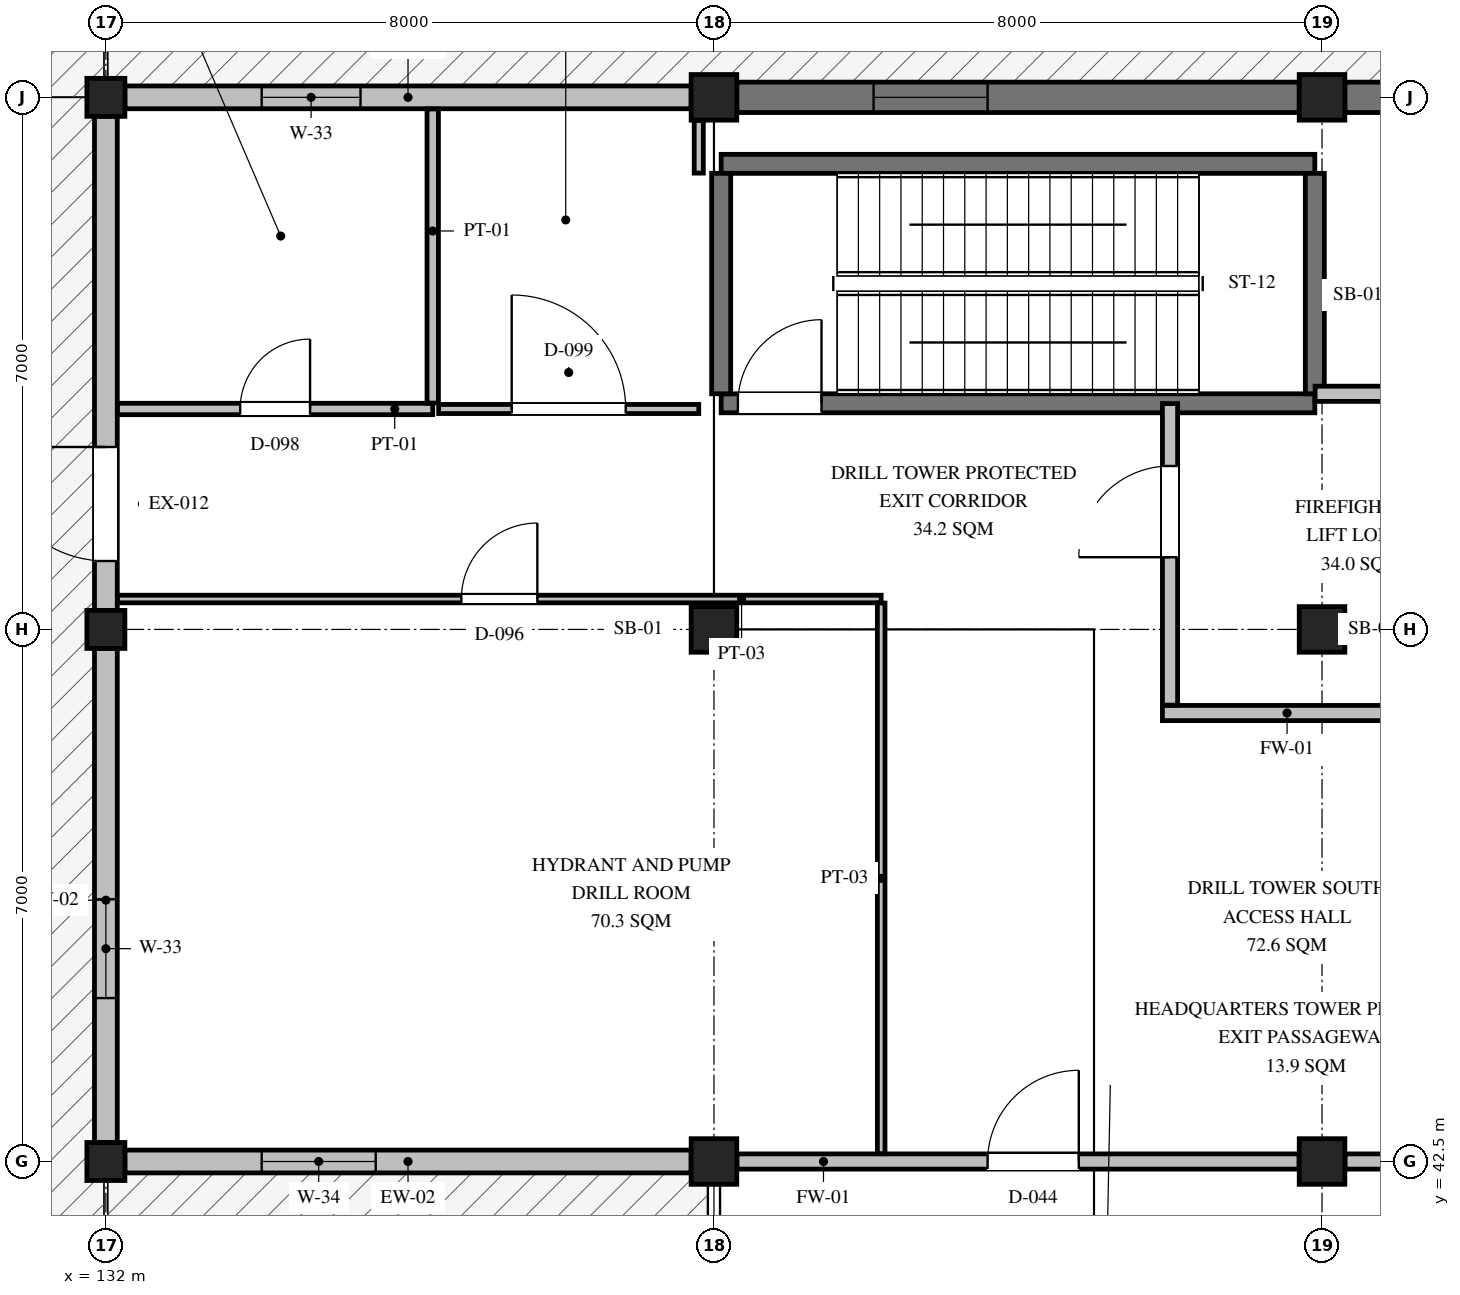
"""IFC4 building model, lengths in metres.
Left out: names, types, materials, properties, quantities, classifications, styles, units other than length and angle.
Written with IfcOpenShell. Run it as: python <this file> out.ifc"""

import sys

from ifc_helpers import new_model, si_unit, direction, frame, frame_2d, origin, origin_2d, place, context, subcontext, project, spatial, rectangle, extrude, element, fill, save


model = new_model("IFC4")
c1 = context("Model", 3, precision=1e-05, world=origin(), true_north=direction((0.0, 1.0)))
c2 = subcontext(c1, "Body", "Model", "MODEL_VIEW")
j1 = project(units=[si_unit("LENGTHUNIT", "METRE"), si_unit("PLANEANGLEUNIT", "RADIAN")], contexts=[c1])
p1 = place(None, origin())
s1 = spatial("IfcSite", under=j1, at=p1, CompositionType="ELEMENT")
p2 = place(p1, origin())
s2 = spatial("IfcBuilding", under=s1, at=p2, CompositionType="ELEMENT")
p3 = place(p2, frame((0.0, 0.0, 0.45)))
s3 = spatial("IfcBuildingStorey", under=s2, at=p3, CompositionType="ELEMENT", Elevation=0.45)
for number, where, z_axis, x_axis in (
    (1, (132.0, 42.5, -0.45), (0.0, 0.0, 1.0), (1.0, 0.0, 0.0)),
    (2, (132.0, 49.5, -0.45), (0.0, 0.0, 1.0), (1.0, 0.0, 0.0)),
    (3, (132.0, 56.5, -0.45), (0.0, 0.0, 1.0), (1.0, 0.0, 0.0)),
):
    element("IfcColumn", number, at=place(p3, frame(where, z_axis=z_axis, x_axis=x_axis)), inside=s3, PredefinedType="COLUMN", context=c2, shape_type="SweptSolid", body=[
        extrude(rectangle(XDim=0.5, YDim=0.5, at=origin_2d()), origin(), (0.0, 0.0, 1.0), 5.85),
    ])
for number, where, z_axis, x_axis in (
    (4, (140.0, 42.5, -0.45), (0.0, 0.0, 1.0), (1.0, 0.0, 0.0)),
    (5, (140.0, 49.5, -0.45), (0.0, 0.0, 1.0), (1.0, 0.0, 0.0)),
    (6, (140.0, 56.5, -0.45), (0.0, 0.0, 1.0), (1.0, 0.0, 0.0)),
    (7, (148.0, 42.5, -0.45), (0.0, 0.0, 1.0), (1.0, 0.0, 0.0)),
    (8, (148.0, 49.5, -0.45), (0.0, 0.0, 1.0), (1.0, 0.0, 0.0)),
    (9, (148.0, 56.5, -0.45), (0.0, 0.0, 1.0), (1.0, 0.0, 0.0)),
):
    element("IfcColumn", number, at=place(p3, frame(where, z_axis=z_axis, x_axis=x_axis)), inside=s3, PredefinedType="COLUMN", context=c2, shape_type="SweptSolid", body=[
        extrude(rectangle(XDim=0.6, YDim=0.6, at=origin_2d()), origin(), (0.0, 0.0, 1.0), 5.85),
    ])
p4 = place(p3, frame((132.25, 56.5, 0.0), z_axis=(0.0, 0.0, 1.0), x_axis=(1.0, 0.0, 0.0)))
e10 = element("IfcWall", 10, at=p4, inside=s3, PredefinedType="SOLIDWALL", context=c2, shape_type="SweptSolid", body=[
    extrude(rectangle(XDim=7.45, YDim=0.3, at=frame_2d((3.725, 0.0))), origin(), (0.0, 0.0, 1.0), 4.794),
])
p5 = place(p4, frame((1.8, 0.0, 0.9)))
e11 = element("IfcOpeningElement", 11, at=p5, cuts=e10, PredefinedType="OPENING", context=c2, shape_type="SweptSolid", body=[
    extrude(rectangle(XDim=1.3, YDim=2.0, at=frame_2d((0.65, 1.0))), frame((0.0, 0.16, 0.0), z_axis=(0.0, -1.0, 0.0), x_axis=(1.0, 0.0, 0.0)), (0.0, 0.0, 1.0), 0.32),
])
p6 = place(p3, frame((140.3, 56.5, 0.0), z_axis=(0.0, 0.0, 1.0), x_axis=(1.0, 0.0, 0.0)))
e12 = element("IfcWall", 12, at=p6, inside=s3, PredefinedType="SHEAR", context=c2, shape_type="SweptSolid", body=[
    extrude(rectangle(XDim=7.4, YDim=0.4, at=frame_2d((3.7, 0.0))), origin(), (0.0, 0.0, 1.0), 5.2),
])
p7 = place(p6, frame((1.8, 0.0, 0.9)))
e13 = element("IfcOpeningElement", 13, at=p7, cuts=e12, PredefinedType="OPENING", context=c2, shape_type="SweptSolid", body=[
    extrude(rectangle(XDim=1.5, YDim=2.1, at=frame_2d((0.75, 1.05))), frame((0.0, 0.21, 0.0), z_axis=(0.0, -1.0, 0.0), x_axis=(1.0, 0.0, 0.0)), (0.0, 0.0, 1.0), 0.42),
])
p8 = place(p3, frame((148.3, 56.5, 0.0), z_axis=(0.0, 0.0, 1.0), x_axis=(1.0, 0.0, 0.0)))
e14 = element("IfcWall", 14, at=p8, inside=s3, PredefinedType="SHEAR", context=c2, shape_type="SweptSolid", body=[
    extrude(rectangle(XDim=12.4, YDim=0.4, at=frame_2d((6.2, 0.0))), origin(), (0.0, 0.0, 1.0), 5.2),
])
p9 = place(p8, frame((1.8, 0.0, 0.9)))
e15 = element("IfcOpeningElement", 15, at=p9, cuts=e14, PredefinedType="OPENING", context=c2, shape_type="SweptSolid", body=[
    extrude(rectangle(XDim=1.8, YDim=2.1, at=frame_2d((0.9, 1.05))), frame((0.0, 0.21, 0.0), z_axis=(0.0, -1.0, 0.0), x_axis=(1.0, 0.0, 0.0)), (0.0, 0.0, 1.0), 0.42),
])
p10 = place(p3, frame((132.0, 42.75, 0.0), z_axis=(0.0, 0.0, 1.0), x_axis=(0.0, 1.0, 0.0)))
e16 = element("IfcWall", 16, at=p10, inside=s3, PredefinedType="SOLIDWALL", context=c2, shape_type="SweptSolid", body=[
    extrude(rectangle(XDim=6.5, YDim=0.3, at=frame_2d((3.25, 0.0))), origin(), (0.0, 0.0, 1.0), 4.854),
])
p11 = place(p10, frame((1.9, 0.0, 0.85)))
e17 = element("IfcOpeningElement", 17, at=p11, cuts=e16, PredefinedType="OPENING", context=c2, shape_type="SweptSolid", body=[
    extrude(rectangle(XDim=1.3, YDim=2.0, at=frame_2d((0.65, 1.0))), frame((0.0, 0.16, 0.0), z_axis=(0.0, -1.0, 0.0), x_axis=(1.0, 0.0, 0.0)), (0.0, 0.0, 1.0), 0.32),
])
p12 = place(p3, frame((132.0, 49.75, 0.0), z_axis=(0.0, 0.0, 1.0), x_axis=(0.0, 1.0, 0.0)))
e18 = element("IfcWall", 18, at=p12, inside=s3, PredefinedType="SOLIDWALL", context=c2, shape_type="SweptSolid", body=[
    extrude(rectangle(XDim=6.5, YDim=0.3, at=frame_2d((3.25, 0.0))), origin(), (0.0, 0.0, 1.0), 4.494),
])
p13 = place(p12, frame((0.65, 0.0, 0.0)))
e19 = element("IfcOpeningElement", 19, at=p13, cuts=e18, PredefinedType="OPENING", context=c2, shape_type="SweptSolid", body=[
    extrude(rectangle(XDim=1.5, YDim=2.4, at=frame_2d((0.75, 1.2))), frame((0.0, 0.16, 0.0), z_axis=(0.0, -1.0, 0.0), x_axis=(1.0, 0.0, 0.0)), (0.0, 0.0, 1.0), 0.32),
])
p14 = place(p3, frame((132.25, 42.5, 0.0), z_axis=(0.0, 0.0, 1.0), x_axis=(1.0, 0.0, 0.0)))
e20 = element("IfcWall", 20, at=p14, inside=s3, PredefinedType="SOLIDWALL", context=c2, shape_type="SweptSolid", body=[
    extrude(rectangle(XDim=7.45, YDim=0.3, at=frame_2d((3.725, 0.0))), origin(), (0.0, 0.0, 1.0), 4.854),
])
p15 = place(p14, frame((1.8, 0.0, 0.9)))
e21 = element("IfcOpeningElement", 21, at=p15, cuts=e20, PredefinedType="OPENING", context=c2, shape_type="SweptSolid", body=[
    extrude(rectangle(XDim=1.5, YDim=2.1, at=frame_2d((0.75, 1.05))), frame((0.0, 0.16, 0.0), z_axis=(0.0, -1.0, 0.0), x_axis=(1.0, 0.0, 0.0)), (0.0, 0.0, 1.0), 0.32),
])
p16 = place(p3, frame((140.095, 52.475, 0.0), z_axis=(0.0, 0.0, 1.0), x_axis=(1.0, 0.0, 0.0)))
e22 = element("IfcWall", 22, at=p16, inside=s3, PredefinedType="SHEAR", context=c2, shape_type="SweptSolid", body=[
    extrude(rectangle(XDim=7.81, YDim=0.25, at=frame_2d((3.905, 0.0))), origin(), (0.0, 0.0, 1.0), 5.2),
])
p17 = place(p16, frame((0.22, 0.0, 0.0)))
e23 = element("IfcOpeningElement", 23, at=p17, cuts=e22, PredefinedType="OPENING", context=c2, shape_type="SweptSolid", body=[
    extrude(rectangle(XDim=1.1, YDim=2.15, at=frame_2d((0.55, 1.075))), frame((0.0, 0.135, 0.0), z_axis=(0.0, -1.0, 0.0), x_axis=(1.0, 0.0, 0.0)), (0.0, 0.0, 1.0), 0.27),
])
p18 = place(p3, frame((140.095, 55.625, 0.0), z_axis=(0.0, 0.0, 1.0), x_axis=(1.0, 0.0, 0.0)))
e24 = element("IfcWall", 24, at=p18, inside=s3, PredefinedType="SHEAR", context=c2, shape_type="SweptSolid", body=[
    extrude(rectangle(XDim=7.81, YDim=0.25, at=frame_2d((3.905, 0.0))), origin(), (0.0, 0.0, 1.0), 5.2),
])
for number, where, z_axis, x_axis in (
    (25, (140.095, 52.6, 0.0), (0.0, 0.0, 1.0), (0.0, 1.0, 0.0)),
    (26, (147.905, 52.6, 0.0), (0.0, 0.0, 1.0), (0.0, 1.0, 0.0)),
):
    element("IfcWall", number, at=place(p3, frame(where, z_axis=z_axis, x_axis=x_axis)), inside=s3, PredefinedType="SHEAR", context=c2, shape_type="SweptSolid", body=[
        extrude(rectangle(XDim=2.9, YDim=0.25, at=frame_2d((1.45, 0.0))), origin(), (0.0, 0.0, 1.0), 5.2),
    ])
p19 = place(p3, frame((140.302, 42.5, 0.0), z_axis=(0.0, 0.0, 1.0), x_axis=(1.0, 0.0, 0.0)))
e27 = element("IfcWall", 27, at=p19, inside=s3, PredefinedType="PARTITIONING", context=c2, shape_type="SweptSolid", body=[
    extrude(rectangle(XDim=7.396, YDim=0.2, at=frame_2d((3.698, 0.0))), origin(), (0.0, 0.0, 1.0), 4.494),
])
p20 = place(p19, frame((3.298, 0.0, 0.0)))
e28 = element("IfcOpeningElement", 28, at=p20, cuts=e27, PredefinedType="OPENING", context=c2, shape_type="SweptSolid", body=[
    extrude(rectangle(XDim=1.2, YDim=2.15, at=frame_2d((0.6, 1.075))), frame((0.0, 0.11, 0.0), z_axis=(0.0, -1.0, 0.0), x_axis=(1.0, 0.0, 0.0)), (0.0, 0.0, 1.0), 0.22),
])
p21 = place(p3, frame((148.302, 42.5, 0.0), z_axis=(0.0, 0.0, 1.0), x_axis=(1.0, 0.0, 0.0)))
e29 = element("IfcWall", 29, at=p21, inside=s3, PredefinedType="PARTITIONING", context=c2, shape_type="SweptSolid", body=[
    extrude(rectangle(XDim=5.896, YDim=0.2, at=frame_2d((2.948, 0.0))), origin(), (0.0, 0.0, 1.0), 4.694),
])
p22 = place(p3, frame((147.909, 52.6, 0.0), z_axis=(0.0, 0.0, 1.0), x_axis=(1.0, 0.0, 0.0)))
e30 = element("IfcWall", 30, at=p22, inside=s3, PredefinedType="PARTITIONING", context=c2, shape_type="SweptSolid", body=[
    extrude(rectangle(XDim=1.362, YDim=0.2, at=frame_2d((0.681, 0.0))), origin(), (0.0, 0.0, 1.0), 5.2),
])
p23 = place(p3, frame((145.9, 48.4, 0.0), z_axis=(0.0, 0.0, 1.0), x_axis=(1.0, 0.0, 0.0)))
e31 = element("IfcWall", 31, at=p23, inside=s3, PredefinedType="PARTITIONING", context=c2, shape_type="SweptSolid", body=[
    extrude(rectangle(XDim=8.7, YDim=0.2, at=frame_2d((4.35, 0.0))), origin(), (0.0, 0.0, 1.0), 5.2),
])
p24 = place(p23, frame((4.3, 0.0, 0.0)))
e32 = element("IfcOpeningElement", 32, at=p24, cuts=e31, PredefinedType="OPENING", context=c2, shape_type="SweptSolid", body=[
    extrude(rectangle(XDim=1.2, YDim=2.15, at=frame_2d((0.6, 1.075))), frame((0.0, 0.11, 0.0), z_axis=(0.0, -1.0, 0.0), x_axis=(1.0, 0.0, 0.0)), (0.0, 0.0, 1.0), 0.22),
])
p25 = place(p3, frame((146.0, 48.504, 0.0), z_axis=(0.0, 0.0, 1.0), x_axis=(0.0, 1.0, 0.0)))
e33 = element("IfcWall", 33, at=p25, inside=s3, PredefinedType="PARTITIONING", context=c2, shape_type="SweptSolid", body=[
    extrude(rectangle(XDim=3.967, YDim=0.2, at=frame_2d((1.983, 0.0))), origin(), (0.0, 0.0, 1.0), 5.2),
])
p26 = place(p25, frame((1.946, 0.0, 0.0)))
e34 = element("IfcOpeningElement", 34, at=p26, cuts=e33, PredefinedType="OPENING", context=c2, shape_type="SweptSolid", body=[
    extrude(rectangle(XDim=1.2, YDim=2.15, at=frame_2d((0.6, 1.075))), frame((0.0, 0.11, 0.0), z_axis=(0.0, -1.0, 0.0), x_axis=(1.0, 0.0, 0.0)), (0.0, 0.0, 1.0), 0.22),
])
p27 = place(p3, frame((132.153, 49.9, 0.0), z_axis=(0.0, 0.0, 1.0), x_axis=(1.0, 0.0, 0.0)))
e35 = element("IfcWall", 35, at=p27, inside=s3, PredefinedType="PARTITIONING", context=c2, shape_type="SweptSolid", body=[
    extrude(rectangle(XDim=10.047, YDim=0.1, at=frame_2d((5.023, 0.0))), origin(), (0.0, 0.0, 1.0), 5.2),
])
p28 = place(p27, frame((4.523, 0.0, 0.0)))
e36 = element("IfcOpeningElement", 36, at=p28, cuts=e35, PredefinedType="OPENING", context=c2, shape_type="SweptSolid", body=[
    extrude(rectangle(XDim=1.0, YDim=2.1, at=frame_2d((0.5, 1.05))), frame((0.0, 0.06, 0.0), z_axis=(0.0, -1.0, 0.0), x_axis=(1.0, 0.0, 0.0)), (0.0, 0.0, 1.0), 0.12),
])
p29 = place(p3, frame((142.2, 42.603, 0.0), z_axis=(0.0, 0.0, 1.0), x_axis=(0.0, 1.0, 0.0)))
e37 = element("IfcWall", 37, at=p29, inside=s3, PredefinedType="PARTITIONING", context=c2, shape_type="SweptSolid", body=[
    extrude(rectangle(XDim=7.244, YDim=0.1, at=frame_2d((3.622, 0.0))), origin(), (0.0, 0.0, 1.0), 5.2),
])
p30 = place(p3, frame((132.153, 52.4, 0.0), z_axis=(0.0, 0.0, 1.0), x_axis=(1.0, 0.0, 0.0)))
e38 = element("IfcWall", 38, at=p30, inside=s3, PredefinedType="PARTITIONING", context=c2, shape_type="SweptSolid", body=[
    extrude(rectangle(XDim=4.147, YDim=0.15, at=frame_2d((2.073, 0.0))), origin(), (0.0, 0.0, 1.0), 5.2),
])
p31 = place(p30, frame((1.614, 0.0, 0.0)))
e39 = element("IfcOpeningElement", 39, at=p31, cuts=e38, PredefinedType="OPENING", context=c2, shape_type="SweptSolid", body=[
    extrude(rectangle(XDim=0.92, YDim=2.1, at=frame_2d((0.46, 1.05))), frame((0.0, 0.085, 0.0), z_axis=(0.0, -1.0, 0.0), x_axis=(1.0, 0.0, 0.0)), (0.0, 0.0, 1.0), 0.17),
])
p32 = place(p3, frame((136.3, 52.478, 0.0), z_axis=(0.0, 0.0, 1.0), x_axis=(0.0, 1.0, 0.0)))
e40 = element("IfcWall", 40, at=p32, inside=s3, PredefinedType="PARTITIONING", context=c2, shape_type="SweptSolid", body=[
    extrude(rectangle(XDim=3.869, YDim=0.15, at=frame_2d((1.935, 0.0))), origin(), (0.0, 0.0, 1.0), 5.2),
])
p33 = place(p3, frame((136.378, 52.4, 0.0), z_axis=(0.0, 0.0, 1.0), x_axis=(1.0, 0.0, 0.0)))
e41 = element("IfcWall", 41, at=p33, inside=s3, PredefinedType="PARTITIONING", context=c2, shape_type="SweptSolid", body=[
    extrude(rectangle(XDim=3.422, YDim=0.12, at=frame_2d((1.711, 0.0))), origin(), (0.0, 0.0, 1.0), 5.2),
])
p34 = place(p33, frame((0.961, 0.0, 0.0)))
e42 = element("IfcOpeningElement", 42, at=p34, cuts=e41, PredefinedType="OPENING", context=c2, shape_type="SweptSolid", body=[
    extrude(rectangle(XDim=1.5, YDim=2.25, at=frame_2d((0.75, 1.125))), frame((0.0, 0.07, 0.0), z_axis=(0.0, -1.0, 0.0), x_axis=(1.0, 0.0, 0.0)), (0.0, 0.0, 1.0), 0.14),
])
p35 = place(p3, frame((139.8, 55.503, 0.0), z_axis=(0.0, 0.0, 1.0), x_axis=(0.0, 1.0, 0.0)))
e43 = element("IfcWall", 43, at=p35, inside=s3, PredefinedType="PARTITIONING", context=c2, shape_type="SweptSolid", body=[
    extrude(rectangle(XDim=0.694, YDim=0.12, at=frame_2d((0.347, 0.0))), origin(), (0.0, 0.0, 1.0), 5.2),
])
p36 = place(p5, origin())
e44 = element("IfcWindow", 44, at=p36, inside=s3, PartitioningType="SINGLE_PANEL", PredefinedType="WINDOW", context=c2, shape_type="SweptSolid", body=[
    extrude(rectangle(XDim=1.3, YDim=2.0, at=frame_2d((0.65, 1.0))), frame((0.0, 0.03, 0.0), z_axis=(0.0, -1.0, 0.0), x_axis=(1.0, 0.0, 0.0)), (0.0, 0.0, 1.0), 0.06),
])
fill(e11, e44)
p37 = place(p7, origin())
e45 = element("IfcWindow", 45, at=p37, inside=s3, PartitioningType="SINGLE_PANEL", PredefinedType="WINDOW", context=c2, shape_type="SweptSolid", body=[
    extrude(rectangle(XDim=1.5, YDim=2.1, at=frame_2d((0.75, 1.05))), frame((0.0, 0.03, 0.0), z_axis=(0.0, -1.0, 0.0), x_axis=(1.0, 0.0, 0.0)), (0.0, 0.0, 1.0), 0.06),
])
fill(e13, e45)
p38 = place(p11, origin())
e46 = element("IfcWindow", 46, at=p38, inside=s3, PartitioningType="SINGLE_PANEL", PredefinedType="WINDOW", context=c2, shape_type="SweptSolid", body=[
    extrude(rectangle(XDim=1.3, YDim=2.0, at=frame_2d((0.65, 1.0))), frame((0.0, 0.03, 0.0), z_axis=(0.0, -1.0, 0.0), x_axis=(1.0, 0.0, 0.0)), (0.0, 0.0, 1.0), 0.06),
])
fill(e17, e46)
p39 = place(p13, origin())
e47 = element("IfcDoor", 47, at=p39, inside=s3, OperationType="SINGLE_SWING_RIGHT", PredefinedType="DOOR", context=c2, shape_type="SweptSolid", body=[
    extrude(rectangle(XDim=1.5, YDim=2.4, at=frame_2d((0.75, 1.2))), frame((0.0, 0.025, 0.0), z_axis=(0.0, -1.0, 0.0), x_axis=(1.0, 0.0, 0.0)), (0.0, 0.0, 1.0), 0.05),
])
fill(e19, e47)
p40 = place(p15, origin())
e48 = element("IfcWindow", 48, at=p40, inside=s3, PartitioningType="SINGLE_PANEL", PredefinedType="WINDOW", context=c2, shape_type="SweptSolid", body=[
    extrude(rectangle(XDim=1.5, YDim=2.1, at=frame_2d((0.75, 1.05))), frame((0.0, 0.03, 0.0), z_axis=(0.0, -1.0, 0.0), x_axis=(1.0, 0.0, 0.0)), (0.0, 0.0, 1.0), 0.06),
])
fill(e21, e48)
p41 = place(p17, frame((1.1, 0.0, 0.0), z_axis=(0.0, 0.0, 1.0), x_axis=(-1.0, 0.0, 0.0)))
e49 = element("IfcDoor", 49, at=p41, inside=s3, OperationType="SINGLE_SWING_RIGHT", PredefinedType="DOOR", context=c2, shape_type="SweptSolid", body=[
    extrude(rectangle(XDim=1.1, YDim=2.15, at=frame_2d((0.55, 1.075))), frame((0.0, 0.025, 0.0), z_axis=(0.0, -1.0, 0.0), x_axis=(1.0, 0.0, 0.0)), (0.0, 0.0, 1.0), 0.05),
])
fill(e23, e49)
p42 = place(p20, origin())
e50 = element("IfcDoor", 50, at=p42, inside=s3, OperationType="SINGLE_SWING_RIGHT", PredefinedType="DOOR", context=c2, shape_type="SweptSolid", body=[
    extrude(rectangle(XDim=1.2, YDim=2.15, at=frame_2d((0.6, 1.075))), frame((0.0, 0.025, 0.0), z_axis=(0.0, -1.0, 0.0), x_axis=(1.0, 0.0, 0.0)), (0.0, 0.0, 1.0), 0.05),
])
fill(e28, e50)
p43 = place(p26, origin())
e51 = element("IfcDoor", 51, at=p43, inside=s3, OperationType="SINGLE_SWING_LEFT", PredefinedType="DOOR", context=c2, shape_type="SweptSolid", body=[
    extrude(rectangle(XDim=1.2, YDim=2.15, at=frame_2d((0.6, 1.075))), frame((0.0, 0.025, 0.0), z_axis=(0.0, -1.0, 0.0), x_axis=(1.0, 0.0, 0.0)), (0.0, 0.0, 1.0), 0.05),
])
fill(e34, e51)
p44 = place(p28, origin())
e52 = element("IfcDoor", 52, at=p44, inside=s3, OperationType="SINGLE_SWING_RIGHT", PredefinedType="DOOR", context=c2, shape_type="SweptSolid", body=[
    extrude(rectangle(XDim=1.0, YDim=2.1, at=frame_2d((0.5, 1.05))), frame((0.0, 0.025, 0.0), z_axis=(0.0, -1.0, 0.0), x_axis=(1.0, 0.0, 0.0)), (0.0, 0.0, 1.0), 0.05),
])
fill(e36, e52)
p45 = place(p31, origin())
e53 = element("IfcDoor", 53, at=p45, inside=s3, OperationType="SINGLE_SWING_RIGHT", PredefinedType="DOOR", context=c2, shape_type="SweptSolid", body=[
    extrude(rectangle(XDim=0.92, YDim=2.1, at=frame_2d((0.46, 1.05))), frame((0.0, 0.025, 0.0), z_axis=(0.0, -1.0, 0.0), x_axis=(1.0, 0.0, 0.0)), (0.0, 0.0, 1.0), 0.05),
])
fill(e39, e53)
p46 = place(p34, origin())
e54 = element("IfcDoor", 54, at=p46, inside=s3, OperationType="SINGLE_SWING_LEFT", PredefinedType="DOOR", context=c2, shape_type="SweptSolid", body=[
    extrude(rectangle(XDim=1.5, YDim=2.25, at=frame_2d((0.75, 1.125))), frame((0.0, 0.025, 0.0), z_axis=(0.0, -1.0, 0.0), x_axis=(1.0, 0.0, 0.0)), (0.0, 0.0, 1.0), 0.05),
])
fill(e42, e54)
save(model, sys.argv[1])
